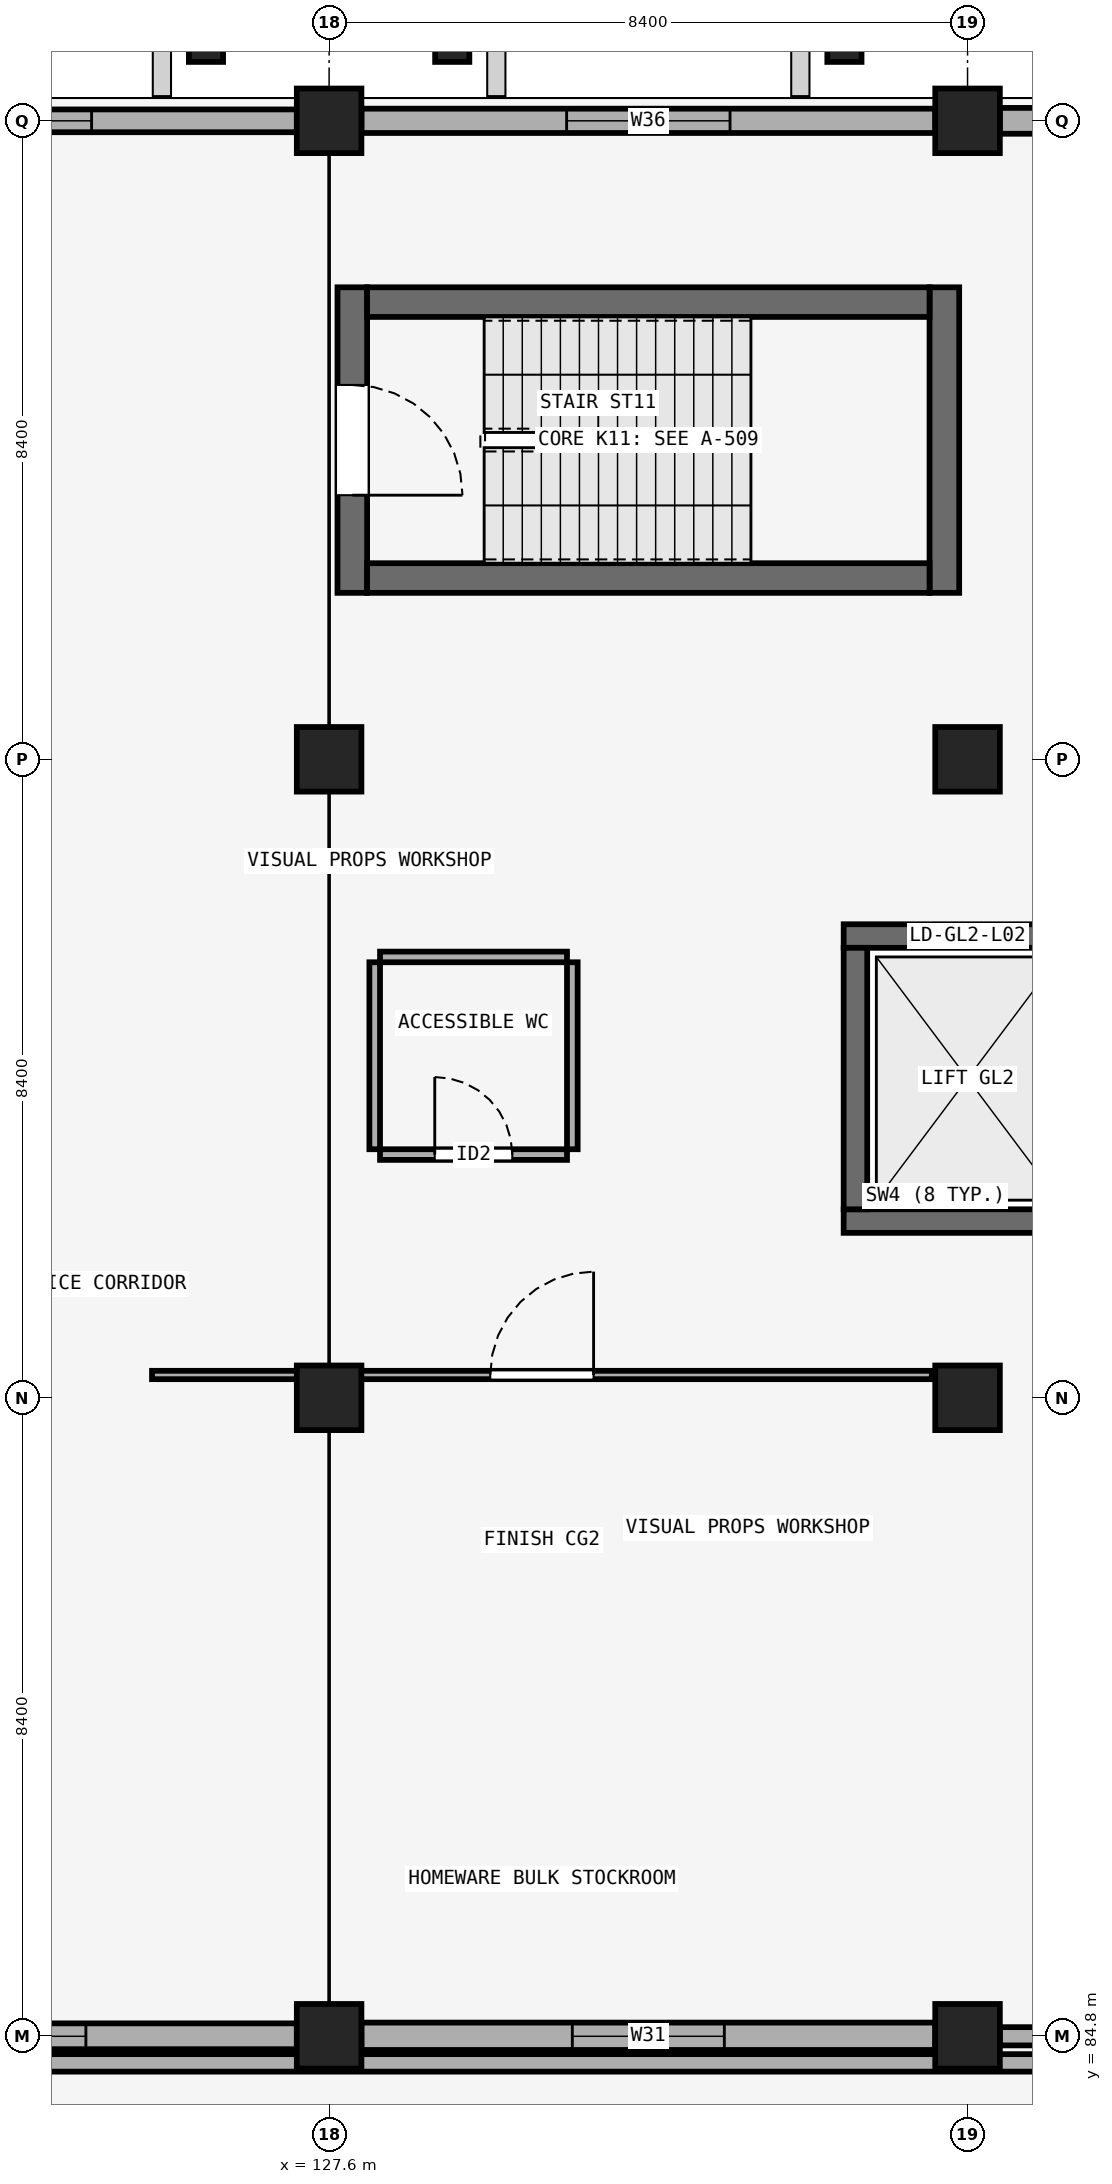
"""IFC4 building model, lengths in metres.
Left out: names, types, materials, properties, quantities, classifications, styles, units other than length and angle.
Written with IfcOpenShell. Run it as: python <this file> out.ifc"""

import sys

from ifc_helpers import new_model, si_unit, direction, frame, frame_2d, origin, origin_2d, place, context, subcontext, project, spatial, rectangle, extrude, element, fill, save


model = new_model("IFC4")
c1 = context("Model", 3, precision=1e-05, world=origin(), true_north=direction((0.0, 1.0)))
c2 = subcontext(c1, "Body", "Model", "MODEL_VIEW")
j1 = project(units=[si_unit("LENGTHUNIT", "METRE"), si_unit("PLANEANGLEUNIT", "RADIAN")], contexts=[c1])
p1 = place(None, origin())
s1 = spatial("IfcSite", under=j1, at=p1, CompositionType="ELEMENT")
p2 = place(p1, origin())
s2 = spatial("IfcBuilding", under=s1, at=p2, CompositionType="ELEMENT")
p3 = place(p2, frame((0.0, 0.0, 9.9)))
s3 = spatial("IfcBuildingStorey", under=s2, at=p3, CompositionType="ELEMENT", Elevation=9.9)
for number, where, z_axis, x_axis in (
    (1, (127.6, 84.8, 0.0), (0.0, 0.0, 1.0), (1.0, 0.0, 0.0)),
    (2, (136.0, 84.8, 0.0), (0.0, 0.0, 1.0), (1.0, 0.0, 0.0)),
    (3, (127.6, 93.2, 0.0), (0.0, 0.0, 1.0), (1.0, 0.0, 0.0)),
    (4, (136.0, 93.2, 0.0), (0.0, 0.0, 1.0), (1.0, 0.0, 0.0)),
    (5, (127.6, 101.6, 0.0), (0.0, 0.0, 1.0), (1.0, 0.0, 0.0)),
    (6, (136.0, 101.6, 0.0), (0.0, 0.0, 1.0), (1.0, 0.0, 0.0)),
    (7, (127.6, 110.0, 0.0), (0.0, 0.0, 1.0), (1.0, 0.0, 0.0)),
    (8, (136.0, 110.0, 0.0), (0.0, 0.0, 1.0), (1.0, 0.0, 0.0)),
):
    element("IfcColumn", number, at=place(p3, frame(where, z_axis=z_axis, x_axis=x_axis)), inside=s3, PredefinedType="COLUMN", context=c2, shape_type="SweptSolid", body=[
        extrude(rectangle(XDim=0.85, YDim=0.85, at=origin_2d()), origin(), (0.0, 0.0, 1.0), 4.5),
    ])
for number, where, z_axis, x_axis in (
    (9, (125.98, 111.05, 0.0), (0.0, 0.0, 1.0), (1.0, 0.0, 0.0)),
    (10, (129.22, 111.05, 0.0), (0.0, 0.0, 1.0), (1.0, 0.0, 0.0)),
    (11, (134.38, 111.05, 0.0), (0.0, 0.0, 1.0), (1.0, 0.0, 0.0)),
):
    element("IfcColumn", number, at=place(p3, frame(where, z_axis=z_axis, x_axis=x_axis)), inside=s3, PredefinedType="PILASTER", context=c2, shape_type="SweptSolid", body=[
        extrude(rectangle(XDim=0.45, YDim=0.55, at=origin_2d()), origin(), (0.0, 0.0, 1.0), 4.5),
    ])
p4 = place(p3, frame((119.625, 84.8, 0.0), z_axis=(0.0, 0.0, 1.0), x_axis=(1.0, 0.0, 0.0)))
e12 = element("IfcWall", 12, at=p4, inside=s3, PredefinedType="SOLIDWALL", context=c2, shape_type="SweptSolid", body=[
    extrude(rectangle(XDim=7.55, YDim=0.34, at=frame_2d((3.775, 0.0))), origin(), (0.0, 0.0, 1.0), 3.45),
])
p5 = place(p4, frame((2.775, 0.0, 0.95)))
e13 = element("IfcOpeningElement", 13, at=p5, cuts=e12, PredefinedType="OPENING", context=c2, shape_type="SweptSolid", body=[
    extrude(rectangle(XDim=2.0, YDim=1.6, at=frame_2d((1.0, 0.8))), frame((0.0, 0.18, 0.0), z_axis=(0.0, -1.0, 0.0), x_axis=(1.0, 0.0, 0.0)), (0.0, 0.0, 1.0), 0.36),
])
p6 = place(p3, frame((128.025, 84.8, 0.0), z_axis=(0.0, 0.0, 1.0), x_axis=(1.0, 0.0, 0.0)))
e14 = element("IfcWall", 14, at=p6, inside=s3, PredefinedType="SOLIDWALL", context=c2, shape_type="SweptSolid", body=[
    extrude(rectangle(XDim=7.55, YDim=0.36, at=frame_2d((3.775, 0.0))), origin(), (0.0, 0.0, 1.0), 3.45),
])
p7 = place(p6, frame((2.775, 0.0, 0.95)))
e15 = element("IfcOpeningElement", 15, at=p7, cuts=e14, PredefinedType="OPENING", context=c2, shape_type="SweptSolid", body=[
    extrude(rectangle(XDim=2.0, YDim=1.85, at=frame_2d((1.0, 0.925))), frame((0.0, 0.19, 0.0), z_axis=(0.0, -1.0, 0.0), x_axis=(1.0, 0.0, 0.0)), (0.0, 0.0, 1.0), 0.38),
])
p8 = place(p3, frame((136.425, 84.8, 0.0), z_axis=(0.0, 0.0, 1.0), x_axis=(1.0, 0.0, 0.0)))
e16 = element("IfcWall", 16, at=p8, inside=s3, PredefinedType="SOLIDWALL", context=c2, shape_type="SweptSolid", body=[
    extrude(rectangle(XDim=7.55, YDim=0.24, at=frame_2d((3.775, 0.0))), origin(), (0.0, 0.0, 1.0), 3.45),
])
p9 = place(p8, frame((2.775, 0.0, 0.95)))
e17 = element("IfcOpeningElement", 17, at=p9, cuts=e16, PredefinedType="OPENING", context=c2, shape_type="SweptSolid", body=[
    extrude(rectangle(XDim=2.0, YDim=2.1, at=frame_2d((1.0, 1.05))), frame((0.0, 0.13, 0.0), z_axis=(0.0, -1.0, 0.0), x_axis=(1.0, 0.0, 0.0)), (0.0, 0.0, 1.0), 0.26),
])
p10 = place(p3, frame((119.625, 110.0, 0.0), z_axis=(0.0, 0.0, 1.0), x_axis=(1.0, 0.0, 0.0)))
e18 = element("IfcWall", 18, at=p10, inside=s3, PredefinedType="SOLIDWALL", context=c2, shape_type="SweptSolid", body=[
    extrude(rectangle(XDim=7.55, YDim=0.3, at=frame_2d((3.775, 0.0))), origin(), (0.0, 0.0, 1.0), 3.45),
])
p11 = place(p10, frame((2.7, 0.0, 0.95)))
e19 = element("IfcOpeningElement", 19, at=p11, cuts=e18, PredefinedType="OPENING", context=c2, shape_type="SweptSolid", body=[
    extrude(rectangle(XDim=2.15, YDim=1.85, at=frame_2d((1.075, 0.925))), frame((0.0, 0.16, 0.0), z_axis=(0.0, -1.0, 0.0), x_axis=(1.0, 0.0, 0.0)), (0.0, 0.0, 1.0), 0.32),
])
p12 = place(p3, frame((128.025, 110.0, 0.0), z_axis=(0.0, 0.0, 1.0), x_axis=(1.0, 0.0, 0.0)))
e20 = element("IfcWall", 20, at=p12, inside=s3, PredefinedType="SOLIDWALL", context=c2, shape_type="SweptSolid", body=[
    extrude(rectangle(XDim=7.55, YDim=0.32, at=frame_2d((3.775, 0.0))), origin(), (0.0, 0.0, 1.0), 3.45),
])
p13 = place(p12, frame((2.7, 0.0, 0.95)))
e21 = element("IfcOpeningElement", 21, at=p13, cuts=e20, PredefinedType="OPENING", context=c2, shape_type="SweptSolid", body=[
    extrude(rectangle(XDim=2.15, YDim=2.1, at=frame_2d((1.075, 1.05))), frame((0.0, 0.17, 0.0), z_axis=(0.0, -1.0, 0.0), x_axis=(1.0, 0.0, 0.0)), (0.0, 0.0, 1.0), 0.34),
])
p14 = place(p3, frame((136.425, 110.0, 0.0), z_axis=(0.0, 0.0, 1.0), x_axis=(1.0, 0.0, 0.0)))
e22 = element("IfcWall", 22, at=p14, inside=s3, PredefinedType="SOLIDWALL", context=c2, shape_type="SweptSolid", body=[
    extrude(rectangle(XDim=7.55, YDim=0.34, at=frame_2d((3.775, 0.0))), origin(), (0.0, 0.0, 1.0), 3.45),
])
p15 = place(p14, frame((2.625, 0.0, 0.95)))
e23 = element("IfcOpeningElement", 23, at=p15, cuts=e22, PredefinedType="OPENING", context=c2, shape_type="SweptSolid", body=[
    extrude(rectangle(XDim=2.3, YDim=1.35, at=frame_2d((1.15, 0.675))), frame((0.0, 0.18, 0.0), z_axis=(0.0, -1.0, 0.0), x_axis=(1.0, 0.0, 0.0)), (0.0, 0.0, 1.0), 0.36),
])
p16 = place(p3, frame((144.05, 84.45, 0.0), z_axis=(0.0, 0.0, 1.0), x_axis=(-1.0, 0.0, 0.0)))
e24 = element("IfcWall", 24, at=p16, inside=s3, PredefinedType="PARAPET", context=c2, shape_type="SweptSolid", body=[
    extrude(rectangle(XDim=41.95, YDim=0.23, at=frame_2d((20.975, 0.0))), origin(), (0.0, 0.0, 1.0), 0.95),
])
p17 = place(p3, frame((127.905, 107.81, 0.0), z_axis=(0.0, 0.0, 1.0), x_axis=(0.0, -1.0, 0.0)))
e25 = element("IfcWall", 25, at=p17, inside=s3, PredefinedType="SHEAR", context=c2, shape_type="SweptSolid", body=[
    extrude(rectangle(XDim=4.02, YDim=0.39, at=frame_2d((2.01, 0.0))), origin(), (0.0, 0.0, 1.0), 4.2),
])
p18 = place(p17, frame((1.285, 0.0, 0.0)))
e26 = element("IfcOpeningElement", 26, at=p18, cuts=e25, PredefinedType="OPENING", context=c2, shape_type="SweptSolid", body=[
    extrude(rectangle(XDim=1.45, YDim=2.2, at=frame_2d((0.725, 1.1))), frame((0.0, 0.205, 0.0), z_axis=(0.0, -1.0, 0.0), x_axis=(1.0, 0.0, 0.0)), (0.0, 0.0, 1.0), 0.41),
])
p19 = place(p3, frame((135.695, 103.79, 0.0), z_axis=(0.0, 0.0, 1.0), x_axis=(0.0, 1.0, 0.0)))
e27 = element("IfcWall", 27, at=p19, inside=s3, PredefinedType="SHEAR", context=c2, shape_type="SweptSolid", body=[
    extrude(rectangle(XDim=4.02, YDim=0.39, at=frame_2d((2.01, 0.0))), origin(), (0.0, 0.0, 1.0), 4.2),
])
for number, where, z_axis, x_axis in (
    (28, (128.1, 103.985, 0.0), (0.0, 0.0, 1.0), (1.0, 0.0, 0.0)),
    (29, (128.1, 107.615, 0.0), (0.0, 0.0, 1.0), (1.0, 0.0, 0.0)),
):
    element("IfcWall", number, at=place(p3, frame(where, z_axis=z_axis, x_axis=x_axis)), inside=s3, PredefinedType="SHEAR", context=c2, shape_type="SweptSolid", body=[
        extrude(rectangle(XDim=7.4, YDim=0.39, at=frame_2d((3.7, 0.0))), origin(), (0.0, 0.0, 1.0), 4.2),
    ])
p20 = place(p3, frame((134.37, 95.525, 0.0), z_axis=(0.0, 0.0, 1.0), x_axis=(1.0, 0.0, 0.0)))
e30 = element("IfcWall", 30, at=p20, inside=s3, PredefinedType="SHEAR", context=c2, shape_type="SweptSolid", body=[
    extrude(rectangle(XDim=3.26, YDim=0.31, at=frame_2d((1.63, 0.0))), origin(), (0.0, 0.0, 1.0), 4.2),
])
p21 = place(p3, frame((134.37, 99.275, 0.0), z_axis=(0.0, 0.0, 1.0), x_axis=(1.0, 0.0, 0.0)))
e31 = element("IfcWall", 31, at=p21, inside=s3, PredefinedType="SHEAR", context=c2, shape_type="SweptSolid", body=[
    extrude(rectangle(XDim=3.26, YDim=0.31, at=frame_2d((1.63, 0.0))), origin(), (0.0, 0.0, 1.0), 4.2),
])
p22 = place(p21, frame((0.88, 0.0, 0.0)))
e32 = element("IfcOpeningElement", 32, at=p22, cuts=e31, PredefinedType="OPENING", context=c2, shape_type="SweptSolid", body=[
    extrude(rectangle(XDim=1.5, YDim=2.35, at=frame_2d((0.75, 1.175))), frame((0.0, 0.165, 0.0), z_axis=(0.0, -1.0, 0.0), x_axis=(1.0, 0.0, 0.0)), (0.0, 0.0, 1.0), 0.33),
])
p23 = place(p3, frame((134.525, 95.68, 0.0), z_axis=(0.0, 0.0, 1.0), x_axis=(0.0, 1.0, 0.0)))
e33 = element("IfcWall", 33, at=p23, inside=s3, PredefinedType="SHEAR", context=c2, shape_type="SweptSolid", body=[
    extrude(rectangle(XDim=3.44, YDim=0.31, at=frame_2d((1.72, 0.0))), origin(), (0.0, 0.0, 1.0), 4.2),
])
p24 = place(p3, frame((128.27, 96.4, 0.0), z_axis=(0.0, 0.0, 1.0), x_axis=(1.0, 0.0, 0.0)))
e34 = element("IfcWall", 34, at=p24, inside=s3, PredefinedType="PARTITIONING", context=c2, shape_type="SweptSolid", body=[
    extrude(rectangle(XDim=2.46, YDim=0.14, at=frame_2d((1.23, 0.0))), origin(), (0.0, 0.0, 1.0), 4.2),
])
p25 = place(p24, frame((0.72, 0.0, 0.0)))
e35 = element("IfcOpeningElement", 35, at=p25, cuts=e34, PredefinedType="OPENING", context=c2, shape_type="SweptSolid", body=[
    extrude(rectangle(XDim=1.02, YDim=2.15, at=frame_2d((0.51, 1.075))), frame((0.0, 0.08, 0.0), z_axis=(0.0, -1.0, 0.0), x_axis=(1.0, 0.0, 0.0)), (0.0, 0.0, 1.0), 0.16),
])
for number, where, z_axis, x_axis in (
    (36, (128.27, 99.0, 0.0), (0.0, 0.0, 1.0), (1.0, 0.0, 0.0)),
    (37, (128.2, 96.47, 0.0), (0.0, 0.0, 1.0), (0.0, 1.0, 0.0)),
    (38, (130.8, 96.47, 0.0), (0.0, 0.0, 1.0), (0.0, 1.0, 0.0)),
):
    element("IfcWall", number, at=place(p3, frame(where, z_axis=z_axis, x_axis=x_axis)), inside=s3, PredefinedType="PARTITIONING", context=c2, shape_type="SweptSolid", body=[
        extrude(rectangle(XDim=2.46, YDim=0.14, at=frame_2d((1.23, 0.0))), origin(), (0.0, 0.0, 1.0), 4.2),
    ])
p26 = place(p3, frame((125.27, 93.5, 0.0), z_axis=(0.0, 0.0, 1.0), x_axis=(1.0, 0.0, 0.0)))
e39 = element("IfcWall", 39, at=p26, inside=s3, PredefinedType="PARTITIONING", context=c2, shape_type="SweptSolid", body=[
    extrude(rectangle(XDim=10.26, YDim=0.11, at=frame_2d((5.13, 0.0))), origin(), (0.0, 0.0, 1.0), 3.5),
])
p27 = place(p26, frame((4.45, 0.0, 0.0)))
e40 = element("IfcOpeningElement", 40, at=p27, cuts=e39, PredefinedType="OPENING", context=c2, shape_type="SweptSolid", body=[
    extrude(rectangle(XDim=1.36, YDim=2.22, at=frame_2d((0.68, 1.11))), frame((0.0, 0.065, 0.0), z_axis=(0.0, -1.0, 0.0), x_axis=(1.0, 0.0, 0.0)), (0.0, 0.0, 1.0), 0.13),
])
p28 = place(p5, origin())
e41 = element("IfcWindow", 41, at=p28, inside=s3, PartitioningType="DOUBLE_PANEL_VERTICAL", PredefinedType="WINDOW", context=c2, shape_type="SweptSolid", body=[
    extrude(rectangle(XDim=2.0, YDim=1.6, at=frame_2d((1.0, 0.8))), frame((0.0, 0.03, 0.0), z_axis=(0.0, -1.0, 0.0), x_axis=(1.0, 0.0, 0.0)), (0.0, 0.0, 1.0), 0.06),
])
fill(e13, e41)
p29 = place(p7, origin())
e42 = element("IfcWindow", 42, at=p29, inside=s3, PartitioningType="DOUBLE_PANEL_VERTICAL", PredefinedType="WINDOW", context=c2, shape_type="SweptSolid", body=[
    extrude(rectangle(XDim=2.0, YDim=1.85, at=frame_2d((1.0, 0.925))), frame((0.0, 0.03, 0.0), z_axis=(0.0, -1.0, 0.0), x_axis=(1.0, 0.0, 0.0)), (0.0, 0.0, 1.0), 0.06),
])
fill(e15, e42)
p30 = place(p11, origin())
e43 = element("IfcWindow", 43, at=p30, inside=s3, PartitioningType="DOUBLE_PANEL_VERTICAL", PredefinedType="WINDOW", context=c2, shape_type="SweptSolid", body=[
    extrude(rectangle(XDim=2.15, YDim=1.85, at=frame_2d((1.075, 0.925))), frame((0.0, 0.03, 0.0), z_axis=(0.0, -1.0, 0.0), x_axis=(1.0, 0.0, 0.0)), (0.0, 0.0, 1.0), 0.06),
])
fill(e19, e43)
p31 = place(p13, origin())
e44 = element("IfcWindow", 44, at=p31, inside=s3, PartitioningType="DOUBLE_PANEL_VERTICAL", PredefinedType="WINDOW", context=c2, shape_type="SweptSolid", body=[
    extrude(rectangle(XDim=2.15, YDim=2.1, at=frame_2d((1.075, 1.05))), frame((0.0, 0.03, 0.0), z_axis=(0.0, -1.0, 0.0), x_axis=(1.0, 0.0, 0.0)), (0.0, 0.0, 1.0), 0.06),
])
fill(e21, e44)
p32 = place(p18, origin())
e45 = element("IfcDoor", 45, at=p32, inside=s3, OperationType="SINGLE_SWING_RIGHT", PredefinedType="DOOR", context=c2, shape_type="SweptSolid", body=[
    extrude(rectangle(XDim=1.45, YDim=2.2, at=frame_2d((0.725, 1.1))), frame((0.0, 0.025, 0.0), z_axis=(0.0, -1.0, 0.0), x_axis=(1.0, 0.0, 0.0)), (0.0, 0.0, 1.0), 0.05),
])
fill(e26, e45)
p33 = place(p22, origin())
e46 = element("IfcDoor", 46, at=p33, inside=s3, OperationType="SLIDING_TO_LEFT", PredefinedType="DOOR", context=c2, shape_type="SweptSolid", body=[
    extrude(rectangle(XDim=1.5, YDim=2.35, at=frame_2d((0.75, 1.175))), frame((0.0, 0.025, 0.0), z_axis=(0.0, -1.0, 0.0), x_axis=(1.0, 0.0, 0.0)), (0.0, 0.0, 1.0), 0.05),
])
fill(e32, e46)
p34 = place(p25, origin())
e47 = element("IfcDoor", 47, at=p34, inside=s3, OperationType="SINGLE_SWING_LEFT", PredefinedType="DOOR", context=c2, shape_type="SweptSolid", body=[
    extrude(rectangle(XDim=1.02, YDim=2.15, at=frame_2d((0.51, 1.075))), frame((0.0, 0.025, 0.0), z_axis=(0.0, -1.0, 0.0), x_axis=(1.0, 0.0, 0.0)), (0.0, 0.0, 1.0), 0.05),
])
fill(e35, e47)
p35 = place(p27, origin())
e48 = element("IfcDoor", 48, at=p35, inside=s3, OperationType="SINGLE_SWING_RIGHT", PredefinedType="DOOR", context=c2, shape_type="SweptSolid", body=[
    extrude(rectangle(XDim=1.36, YDim=2.22, at=frame_2d((0.68, 1.11))), frame((0.0, 0.025, 0.0), z_axis=(0.0, -1.0, 0.0), x_axis=(1.0, 0.0, 0.0)), (0.0, 0.0, 1.0), 0.05),
])
fill(e40, e48)
save(model, sys.argv[1])
